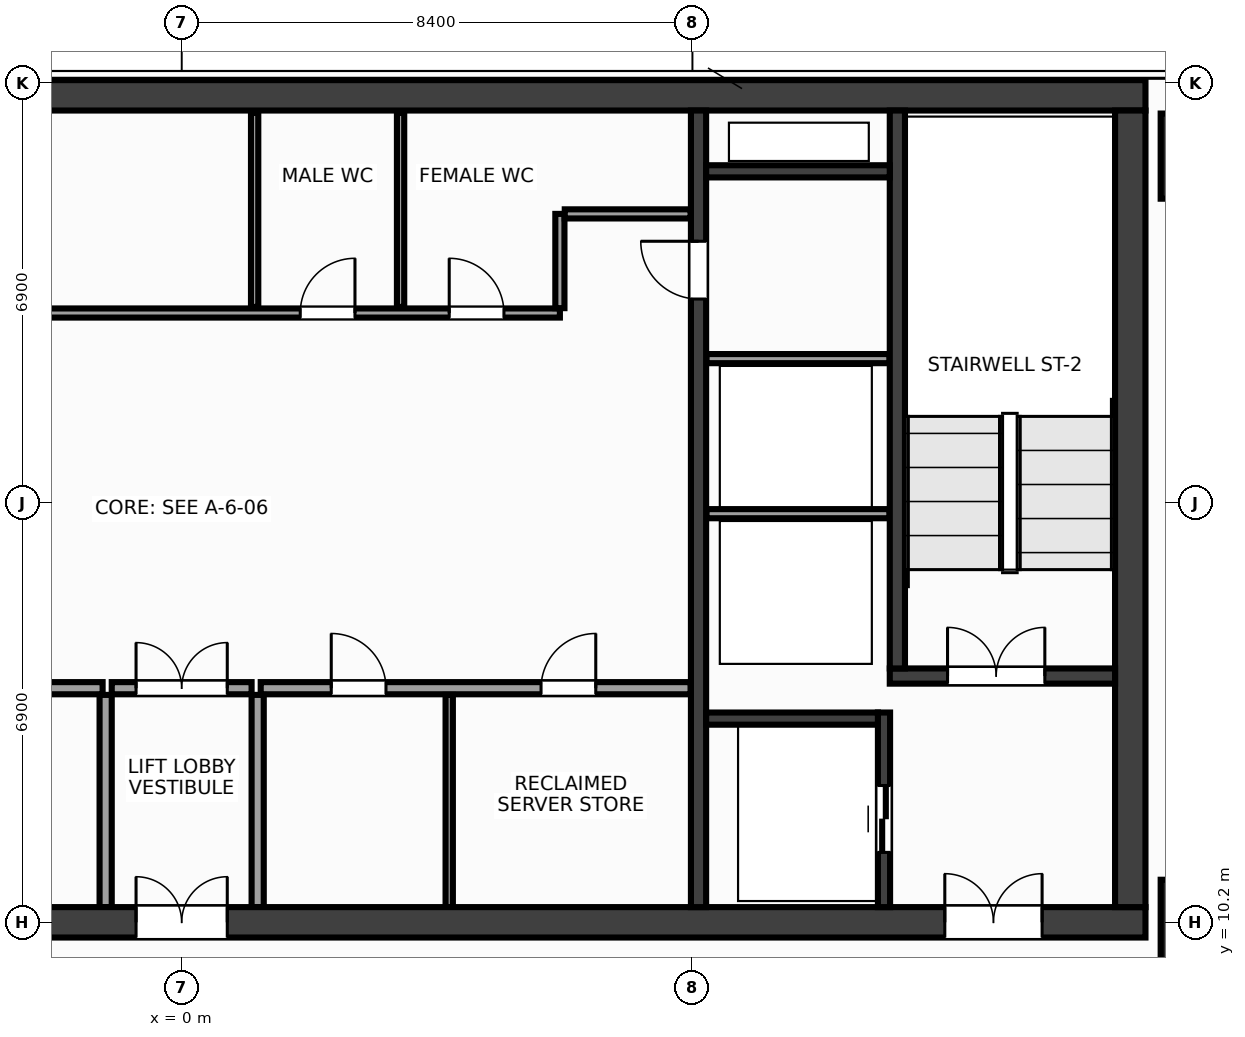
"""IFC4 building model, lengths in metres.
Left out: names, types, materials, properties, quantities, classifications, styles, units other than length and angle.
Written with IfcOpenShell. Run it as: python <this file> out.ifc"""

import sys

from ifc_helpers import new_model, si_unit, direction, frame, frame_2d, origin, origin_2d, place, context, subcontext, project, spatial, rectangle, extrude, source, transform, mapped, element, fill, save


model = new_model("IFC4")
c1 = context("Model", 3, precision=1e-05, world=origin(), true_north=direction((0.0, 1.0)))
c2 = subcontext(c1, "Body", "Model", "MODEL_VIEW")
j1 = project(units=[si_unit("LENGTHUNIT", "METRE"), si_unit("PLANEANGLEUNIT", "RADIAN")], contexts=[c1])
p1 = place(None, origin())
s1 = spatial("IfcSite", under=j1, at=p1, CompositionType="ELEMENT")
p2 = place(p1, origin())
s2 = spatial("IfcBuilding", under=s1, at=p2, CompositionType="ELEMENT")
p3 = place(p2, frame((0.0, 0.0, 250.4)))
s3 = spatial("IfcBuildingStorey", under=s2, at=p3, CompositionType="ELEMENT", Elevation=250.4)
m1 = source(origin(), c2, "Body", "SweptSolid", [
    extrude(rectangle(XDim=31.7, YDim=0.5, at=frame_2d((15.85, 0.0))), origin(), (0.0, 0.0, 1.0), 3.6),
])
p4 = place(p3, frame((-15.85, 23.8, 0.0), z_axis=(0.0, 0.0, 1.0), x_axis=(1.0, 0.0, 0.0)))
e1 = element("IfcWall", 1, at=p4, inside=s3, PredefinedType="SHEAR", context=c2, shape_type="MappedRepresentation", body=[
    mapped(m1, transform((0.0, 0.0, 0.0), x_axis=(1.0, 0.0, 0.0), y_axis=(0.0, 1.0, 0.0), z_axis=(0.0, 0.0, 1.0), scale=1.0)),
])
p5 = place(p3, frame((-15.85, 10.2, 0.0), z_axis=(0.0, 0.0, 1.0), x_axis=(1.0, 0.0, 0.0)))
e2 = element("IfcWall", 2, at=p5, inside=s3, PredefinedType="SHEAR", context=c2, shape_type="MappedRepresentation", body=[
    mapped(m1, transform((0.0, 0.0, 0.0), x_axis=(1.0, 0.0, 0.0), y_axis=(0.0, 1.0, 0.0), z_axis=(0.0, 0.0, 1.0), scale=1.0)),
])
p6 = place(p5, frame((1.7, 0.0, 0.0)))
e3 = element("IfcOpeningElement", 3, at=p6, cuts=e2, PredefinedType="OPENING", context=c2, shape_type="SweptSolid", body=[
    extrude(rectangle(XDim=1.6, YDim=2.15, at=frame_2d((0.8, 1.075))), frame((0.0, 0.262, 0.0), z_axis=(0.0, -1.0, 0.0), x_axis=(1.0, 0.0, 0.0)), (0.0, 0.0, 1.0), 0.524),
])
p7 = place(p5, frame((28.4, 0.0, 0.0)))
e4 = element("IfcOpeningElement", 4, at=p7, cuts=e2, PredefinedType="OPENING", context=c2, shape_type="SweptSolid", body=[
    extrude(rectangle(XDim=1.6, YDim=2.15, at=frame_2d((0.8, 1.075))), frame((0.0, 0.262, 0.0), z_axis=(0.0, -1.0, 0.0), x_axis=(1.0, 0.0, 0.0)), (0.0, 0.0, 1.0), 0.524),
])
p8 = place(p5, frame((15.1, 0.0, 0.0)))
e5 = element("IfcOpeningElement", 5, at=p8, cuts=e2, PredefinedType="OPENING", context=c2, shape_type="SweptSolid", body=[
    extrude(rectangle(XDim=1.5, YDim=2.2, at=frame_2d((0.75, 1.1))), frame((0.0, 0.262, 0.0), z_axis=(0.0, -1.0, 0.0), x_axis=(1.0, 0.0, 0.0)), (0.0, 0.0, 1.0), 0.524),
])
m2 = source(origin(), c2, "Body", "SweptSolid", [
    extrude(rectangle(XDim=13.1, YDim=0.5, at=frame_2d((6.55, 0.0))), origin(), (0.0, 0.0, 1.0), 3.6),
])
p9 = place(p3, frame((15.6, 10.45, 0.0), z_axis=(0.0, 0.0, 1.0), x_axis=(0.0, 1.0, 0.0)))
e6 = element("IfcWall", 6, at=p9, inside=s3, PredefinedType="SHEAR", context=c2, shape_type="MappedRepresentation", body=[
    mapped(m2, transform((0.0, 0.0, 0.0), x_axis=(1.0, 0.0, 0.0), y_axis=(0.0, 1.0, 0.0), z_axis=(0.0, 0.0, 1.0), scale=1.0)),
])
m3 = source(origin(), c2, "Body", "SweptSolid", [
    extrude(rectangle(XDim=13.1, YDim=0.25, at=frame_2d((6.55, 0.0))), origin(), (0.0, 0.0, 1.0), 3.6),
])
p10 = place(p3, frame((8.5, 10.45, 0.0), z_axis=(0.0, 0.0, 1.0), x_axis=(0.0, 1.0, 0.0)))
e7 = element("IfcWall", 7, at=p10, inside=s3, PredefinedType="SHEAR", context=c2, shape_type="MappedRepresentation", body=[
    mapped(m3, transform((0.0, 0.0, 0.0), x_axis=(1.0, 0.0, 0.0), y_axis=(0.0, 1.0, 0.0), z_axis=(0.0, 0.0, 1.0), scale=1.0)),
])
p11 = place(p10, frame((10.0, 0.0, 0.0)))
e8 = element("IfcOpeningElement", 8, at=p11, cuts=e7, PredefinedType="OPENING", context=c2, shape_type="SweptSolid", body=[
    extrude(rectangle(XDim=0.95, YDim=2.15, at=frame_2d((0.475, 1.075))), frame((0.0, 0.137, 0.0), z_axis=(0.0, -1.0, 0.0), x_axis=(1.0, 0.0, 0.0)), (0.0, 0.0, 1.0), 0.274),
])
m4 = source(origin(), c2, "Body", "SweptSolid", [
    extrude(rectangle(XDim=3.705, YDim=0.25, at=frame_2d((1.853, 0.0))), origin(), (0.0, 0.0, 1.0), 3.6),
])
p12 = place(p3, frame((11.645, 14.25, 0.0), z_axis=(0.0, 0.0, 1.0), x_axis=(1.0, 0.0, 0.0)))
e9 = element("IfcWall", 9, at=p12, inside=s3, PredefinedType="SHEAR", context=c2, shape_type="MappedRepresentation", body=[
    mapped(m4, transform((0.0, 0.0, 0.0), x_axis=(1.0, 0.0, 0.0), y_axis=(0.0, 1.0, 0.0), z_axis=(0.0, 0.0, 1.0), scale=1.0)),
])
p13 = place(p12, frame((0.95, 0.0, 0.0)))
e10 = element("IfcOpeningElement", 10, at=p13, cuts=e9, PredefinedType="OPENING", context=c2, shape_type="SweptSolid", body=[
    extrude(rectangle(XDim=1.6, YDim=2.15, at=frame_2d((0.8, 1.075))), frame((0.0, 0.137, 0.0), z_axis=(0.0, -1.0, 0.0), x_axis=(1.0, 0.0, 0.0)), (0.0, 0.0, 1.0), 0.274),
])
m5 = source(origin(), c2, "Body", "SweptSolid", [
    extrude(rectangle(XDim=9.175, YDim=0.25, at=frame_2d((4.587, 0.0))), origin(), (0.0, 0.0, 1.0), 3.6),
])
p14 = place(p3, frame((11.77, 14.375, 0.0), z_axis=(0.0, 0.0, 1.0), x_axis=(0.0, 1.0, 0.0)))
e11 = element("IfcWall", 11, at=p14, inside=s3, PredefinedType="SHEAR", context=c2, shape_type="MappedRepresentation", body=[
    mapped(m5, transform((0.0, 0.0, 0.0), x_axis=(1.0, 0.0, 0.0), y_axis=(0.0, 1.0, 0.0), z_axis=(0.0, 0.0, 1.0), scale=1.0)),
])
m6 = source(origin(), c2, "Body", "SweptSolid", [
    extrude(rectangle(XDim=3.2, YDim=0.2, at=frame_2d((1.6, 0.0))), origin(), (0.0, 0.0, 1.0), 3.6),
])
p15 = place(p3, frame((11.55, 10.45, 0.0), z_axis=(0.0, 0.0, 1.0), x_axis=(0.0, 1.0, 0.0)))
e12 = element("IfcWall", 12, at=p15, inside=s3, PredefinedType="SHEAR", context=c2, shape_type="MappedRepresentation", body=[
    mapped(m6, transform((0.0, 0.0, 0.0), x_axis=(1.0, 0.0, 0.0), y_axis=(0.0, 1.0, 0.0), z_axis=(0.0, 0.0, 1.0), scale=1.0)),
])
p16 = place(p15, frame((0.9, 0.0, 0.0)))
e13 = element("IfcOpeningElement", 13, at=p16, cuts=e12, PredefinedType="OPENING", context=c2, shape_type="SweptSolid", body=[
    extrude(rectangle(XDim=1.1, YDim=2.15, at=frame_2d((0.55, 1.075))), frame((0.0, 0.112, 0.0), z_axis=(0.0, -1.0, 0.0), x_axis=(1.0, 0.0, 0.0)), (0.0, 0.0, 1.0), 0.224),
])
m7 = source(origin(), c2, "Body", "SweptSolid", [
    extrude(rectangle(XDim=2.825, YDim=0.2, at=frame_2d((1.413, 0.0))), origin(), (0.0, 0.0, 1.0), 3.6),
])
p17 = place(p3, frame((8.625, 13.55, 0.0), z_axis=(0.0, 0.0, 1.0), x_axis=(1.0, 0.0, 0.0)))
e14 = element("IfcWall", 14, at=p17, inside=s3, PredefinedType="SHEAR", context=c2, shape_type="MappedRepresentation", body=[
    mapped(m7, transform((0.0, 0.0, 0.0), x_axis=(1.0, 0.0, 0.0), y_axis=(0.0, 1.0, 0.0), z_axis=(0.0, 0.0, 1.0), scale=1.0)),
])
m8 = source(origin(), c2, "Body", "SweptSolid", [
    extrude(rectangle(XDim=3.02, YDim=0.2, at=frame_2d((1.51, 0.0))), origin(), (0.0, 0.0, 1.0), 3.6),
])
p18 = place(p3, frame((8.625, 22.55, 0.0), z_axis=(0.0, 0.0, 1.0), x_axis=(1.0, 0.0, 0.0)))
e15 = element("IfcWall", 15, at=p18, inside=s3, PredefinedType="SHEAR", context=c2, shape_type="MappedRepresentation", body=[
    mapped(m8, transform((0.0, 0.0, 0.0), x_axis=(1.0, 0.0, 0.0), y_axis=(0.0, 1.0, 0.0), z_axis=(0.0, 0.0, 1.0), scale=1.0)),
])
m9 = source(origin(), c2, "Body", "SweptSolid", [
    extrude(rectangle(XDim=1.4, YDim=1.4, at=origin_2d()), origin(), (0.0, 0.0, 1.0), 3.6),
])
for number, where, z_axis, x_axis in (
    (16, (16.8, 10.2, 0.0), (0.0, 0.0, 1.0), (1.0, 0.0, 0.0)),
    (17, (16.8, 22.8, 0.0), (0.0, 0.0, 1.0), (1.0, 0.0, 0.0)),
):
    element("IfcColumn", number, at=place(p3, frame(where, z_axis=z_axis, x_axis=x_axis)), inside=s3, PredefinedType="COLUMN", context=c2, shape_type="MappedRepresentation", body=[
        mapped(m9, transform((0.0, 0.0, 0.0), x_axis=(1.0, 0.0, 0.0), y_axis=(0.0, 1.0, 0.0), z_axis=(0.0, 0.0, 1.0), scale=1.0)),
    ])
m10 = source(origin(), c2, "Body", "SweptSolid", [
    extrude(rectangle(XDim=3.01, YDim=0.15, at=frame_2d((1.505, 0.0))), origin(), (0.0, 0.0, 1.0), 3.37),
])
for number, where, z_axis, x_axis in (
    (18, (8.63, 16.92, 0.0), (0.0, 0.0, 1.0), (1.0, 0.0, 0.0)),
    (19, (8.63, 19.47, 0.0), (0.0, 0.0, 1.0), (1.0, 0.0, 0.0)),
):
    element("IfcWall", number, at=place(p3, frame(where, z_axis=z_axis, x_axis=x_axis)), inside=s3, PredefinedType="PARTITIONING", context=c2, shape_type="MappedRepresentation", body=[
        mapped(m10, transform((0.0, 0.0, 0.0), x_axis=(1.0, 0.0, 0.0), y_axis=(0.0, 1.0, 0.0), z_axis=(0.0, 0.0, 1.0), scale=1.0)),
    ])
m11 = source(origin(), c2, "Body", "SweptSolid", [
    extrude(rectangle(XDim=7.07, YDim=0.2, at=frame_2d((3.535, 0.0))), origin(), (0.0, 0.0, 1.0), 3.37),
])
p19 = place(p3, frame((-8.37, 14.05, 0.0), z_axis=(0.0, 0.0, 1.0), x_axis=(1.0, 0.0, 0.0)))
e20 = element("IfcWall", 20, at=p19, inside=s3, PredefinedType="PARTITIONING", context=c2, shape_type="MappedRepresentation", body=[
    mapped(m11, transform((0.0, 0.0, 0.0), x_axis=(1.0, 0.0, 0.0), y_axis=(0.0, 1.0, 0.0), z_axis=(0.0, 0.0, 1.0), scale=1.0)),
])
p20 = place(p19, frame((2.8, 0.0, 0.0)))
e21 = element("IfcOpeningElement", 21, at=p20, cuts=e20, PredefinedType="OPENING", context=c2, shape_type="SweptSolid", body=[
    extrude(rectangle(XDim=0.98, YDim=2.15, at=frame_2d((0.49, 1.075))), frame((0.0, 0.112, 0.0), z_axis=(0.0, -1.0, 0.0), x_axis=(1.0, 0.0, 0.0)), (0.0, 0.0, 1.0), 0.224),
])
p21 = place(p3, frame((1.3, 14.05, 0.0), z_axis=(0.0, 0.0, 1.0), x_axis=(1.0, 0.0, 0.0)))
e22 = element("IfcWall", 22, at=p21, inside=s3, PredefinedType="PARTITIONING", context=c2, shape_type="MappedRepresentation", body=[
    mapped(m11, transform((0.0, 0.0, 0.0), x_axis=(1.0, 0.0, 0.0), y_axis=(0.0, 1.0, 0.0), z_axis=(0.0, 0.0, 1.0), scale=1.0)),
])
p22 = place(p21, frame((1.16, 0.0, 0.0)))
e23 = element("IfcOpeningElement", 23, at=p22, cuts=e22, PredefinedType="OPENING", context=c2, shape_type="SweptSolid", body=[
    extrude(rectangle(XDim=0.9, YDim=2.15, at=frame_2d((0.45, 1.075))), frame((0.0, 0.112, 0.0), z_axis=(0.0, -1.0, 0.0), x_axis=(1.0, 0.0, 0.0)), (0.0, 0.0, 1.0), 0.224),
])
p23 = place(p21, frame((4.61, 0.0, 0.0)))
e24 = element("IfcOpeningElement", 24, at=p23, cuts=e22, PredefinedType="OPENING", context=c2, shape_type="SweptSolid", body=[
    extrude(rectangle(XDim=0.9, YDim=2.15, at=frame_2d((0.45, 1.075))), frame((0.0, 0.112, 0.0), z_axis=(0.0, -1.0, 0.0), x_axis=(1.0, 0.0, 0.0)), (0.0, 0.0, 1.0), 0.224),
])
m12 = source(origin(), c2, "Body", "SweptSolid", [
    extrude(rectangle(XDim=3.49, YDim=0.2, at=frame_2d((1.745, 0.0))), origin(), (0.0, 0.0, 1.0), 3.37),
])
for number, where, z_axis, x_axis in (
    (25, (-1.25, 10.45, 0.0), (0.0, 0.0, 1.0), (0.0, 1.0, 0.0)),
    (26, (1.25, 10.45, 0.0), (0.0, 0.0, 1.0), (0.0, 1.0, 0.0)),
):
    element("IfcWall", number, at=place(p3, frame(where, z_axis=z_axis, x_axis=x_axis)), inside=s3, PredefinedType="PARTITIONING", context=c2, shape_type="MappedRepresentation", body=[
        mapped(m12, transform((0.0, 0.0, 0.0), x_axis=(1.0, 0.0, 0.0), y_axis=(0.0, 1.0, 0.0), z_axis=(0.0, 0.0, 1.0), scale=1.0)),
    ])
m13 = source(origin(), c2, "Body", "SweptSolid", [
    extrude(rectangle(XDim=2.3, YDim=0.2, at=frame_2d((1.15, 0.0))), origin(), (0.0, 0.0, 1.0), 3.37),
])
p24 = place(p3, frame((-1.15, 14.05, 0.0), z_axis=(0.0, 0.0, 1.0), x_axis=(1.0, 0.0, 0.0)))
e27 = element("IfcWall", 27, at=p24, inside=s3, PredefinedType="PARTITIONING", context=c2, shape_type="MappedRepresentation", body=[
    mapped(m13, transform((0.0, 0.0, 0.0), x_axis=(1.0, 0.0, 0.0), y_axis=(0.0, 1.0, 0.0), z_axis=(0.0, 0.0, 1.0), scale=1.0)),
])
p25 = place(p24, frame((0.4, 0.0, 0.0)))
e28 = element("IfcOpeningElement", 28, at=p25, cuts=e27, PredefinedType="OPENING", context=c2, shape_type="SweptSolid", body=[
    extrude(rectangle(XDim=1.5, YDim=2.2, at=frame_2d((0.75, 1.1))), frame((0.0, 0.112, 0.0), z_axis=(0.0, -1.0, 0.0), x_axis=(1.0, 0.0, 0.0)), (0.0, 0.0, 1.0), 0.224),
])
m14 = source(origin(), c2, "Body", "SweptSolid", [
    extrude(rectangle(XDim=14.59, YDim=0.15, at=frame_2d((7.295, 0.0))), origin(), (0.0, 0.0, 1.0), 3.37),
])
p26 = place(p3, frame((-8.37, 20.22, 0.0), z_axis=(0.0, 0.0, 1.0), x_axis=(1.0, 0.0, 0.0)))
e29 = element("IfcWall", 29, at=p26, inside=s3, PredefinedType="PARTITIONING", context=c2, shape_type="MappedRepresentation", body=[
    mapped(m14, transform((0.0, 0.0, 0.0), x_axis=(1.0, 0.0, 0.0), y_axis=(0.0, 1.0, 0.0), z_axis=(0.0, 0.0, 1.0), scale=1.0)),
])
p27 = place(p26, frame((4.36, 0.0, 0.0)))
e30 = element("IfcOpeningElement", 30, at=p27, cuts=e29, PredefinedType="OPENING", context=c2, shape_type="SweptSolid", body=[
    extrude(rectangle(XDim=0.9, YDim=2.15, at=frame_2d((0.45, 1.075))), frame((0.0, 0.087, 0.0), z_axis=(0.0, -1.0, 0.0), x_axis=(1.0, 0.0, 0.0)), (0.0, 0.0, 1.0), 0.174),
])
p28 = place(p26, frame((10.32, 0.0, 0.0)))
e31 = element("IfcOpeningElement", 31, at=p28, cuts=e29, PredefinedType="OPENING", context=c2, shape_type="SweptSolid", body=[
    extrude(rectangle(XDim=0.9, YDim=2.15, at=frame_2d((0.45, 1.075))), frame((0.0, 0.087, 0.0), z_axis=(0.0, -1.0, 0.0), x_axis=(1.0, 0.0, 0.0)), (0.0, 0.0, 1.0), 0.174),
])
p29 = place(p26, frame((12.77, 0.0, 0.0)))
e32 = element("IfcOpeningElement", 32, at=p29, cuts=e29, PredefinedType="OPENING", context=c2, shape_type="SweptSolid", body=[
    extrude(rectangle(XDim=0.9, YDim=2.15, at=frame_2d((0.45, 1.075))), frame((0.0, 0.087, 0.0), z_axis=(0.0, -1.0, 0.0), x_axis=(1.0, 0.0, 0.0)), (0.0, 0.0, 1.0), 0.174),
])
m15 = source(origin(), c2, "Body", "SweptSolid", [
    extrude(rectangle(XDim=1.55, YDim=0.15, at=frame_2d((0.775, 0.0))), origin(), (0.0, 0.0, 1.0), 3.37),
])
p30 = place(p3, frame((6.22, 20.3, 0.0), z_axis=(0.0, 0.0, 1.0), x_axis=(0.0, 1.0, 0.0)))
e33 = element("IfcWall", 33, at=p30, inside=s3, PredefinedType="PARTITIONING", context=c2, shape_type="MappedRepresentation", body=[
    mapped(m15, transform((0.0, 0.0, 0.0), x_axis=(1.0, 0.0, 0.0), y_axis=(0.0, 1.0, 0.0), z_axis=(0.0, 0.0, 1.0), scale=1.0)),
])
m16 = source(origin(), c2, "Body", "SweptSolid", [
    extrude(rectangle(XDim=2.07, YDim=0.15, at=frame_2d((1.035, 0.0))), origin(), (0.0, 0.0, 1.0), 3.37),
])
p31 = place(p3, frame((6.3, 21.85, 0.0), z_axis=(0.0, 0.0, 1.0), x_axis=(1.0, 0.0, 0.0)))
e34 = element("IfcWall", 34, at=p31, inside=s3, PredefinedType="PARTITIONING", context=c2, shape_type="MappedRepresentation", body=[
    mapped(m16, transform((0.0, 0.0, 0.0), x_axis=(1.0, 0.0, 0.0), y_axis=(0.0, 1.0, 0.0), z_axis=(0.0, 0.0, 1.0), scale=1.0)),
])
m17 = source(origin(), c2, "Body", "SweptSolid", [
    extrude(rectangle(XDim=3.49, YDim=0.12, at=frame_2d((1.745, 0.0))), origin(), (0.0, 0.0, 1.0), 3.37),
])
p32 = place(p3, frame((4.4, 10.45, 0.0), z_axis=(0.0, 0.0, 1.0), x_axis=(0.0, 1.0, 0.0)))
e35 = element("IfcWall", 35, at=p32, inside=s3, PredefinedType="PARTITIONING", context=c2, shape_type="MappedRepresentation", body=[
    mapped(m17, transform((0.0, 0.0, 0.0), x_axis=(1.0, 0.0, 0.0), y_axis=(0.0, 1.0, 0.0), z_axis=(0.0, 0.0, 1.0), scale=1.0)),
])
m18 = source(origin(), c2, "Body", "SweptSolid", [
    extrude(rectangle(XDim=3.19, YDim=0.12, at=frame_2d((1.595, 0.0))), origin(), (0.0, 0.0, 1.0), 3.37),
])
for number, where, z_axis, x_axis in (
    (36, (1.2, 20.32, 0.0), (0.0, 0.0, 1.0), (0.0, 1.0, 0.0)),
    (37, (3.6, 20.32, 0.0), (0.0, 0.0, 1.0), (0.0, 1.0, 0.0)),
):
    element("IfcWall", number, at=place(p3, frame(where, z_axis=z_axis, x_axis=x_axis)), inside=s3, PredefinedType="PARTITIONING", context=c2, shape_type="MappedRepresentation", body=[
        mapped(m18, transform((0.0, 0.0, 0.0), x_axis=(1.0, 0.0, 0.0), y_axis=(0.0, 1.0, 0.0), z_axis=(0.0, 0.0, 1.0), scale=1.0)),
    ])
m19 = source(origin(), c2, "Body", "SweptSolid", [
    extrude(rectangle(XDim=1.6, YDim=2.15, at=frame_2d((0.8, 1.075))), frame((0.0, 0.025, 0.0), z_axis=(0.0, -1.0, 0.0), x_axis=(1.0, 0.0, 0.0)), (0.0, 0.0, 1.0), 0.05),
])
p33 = place(p13, origin())
e38 = element("IfcDoor", 38, at=p33, inside=s3, OperationType="DOUBLE_DOOR_SINGLE_SWING", PredefinedType="DOOR", context=c2, shape_type="MappedRepresentation", body=[
    mapped(m19, transform((0.0, 0.0, 0.0), x_axis=(1.0, 0.0, 0.0), y_axis=(0.0, 1.0, 0.0), z_axis=(0.0, 0.0, 1.0), scale=1.0)),
])
fill(e10, e38)
p34 = place(p7, origin())
e39 = element("IfcDoor", 39, at=p34, inside=s3, OperationType="DOUBLE_DOOR_SINGLE_SWING", PredefinedType="DOOR", context=c2, shape_type="MappedRepresentation", body=[
    mapped(m19, transform((0.0, 0.0, 0.0), x_axis=(1.0, 0.0, 0.0), y_axis=(0.0, 1.0, 0.0), z_axis=(0.0, 0.0, 1.0), scale=1.0)),
])
fill(e4, e39)
m20 = source(origin(), c2, "Body", "SweptSolid", [
    extrude(rectangle(XDim=1.1, YDim=2.15, at=frame_2d((0.55, 1.075))), frame((0.0, 0.025, 0.0), z_axis=(0.0, -1.0, 0.0), x_axis=(1.0, 0.0, 0.0)), (0.0, 0.0, 1.0), 0.05),
])
p35 = place(p16, origin())
e40 = element("IfcDoor", 40, at=p35, inside=s3, OperationType="DOUBLE_DOOR_SLIDING", PredefinedType="DOOR", context=c2, shape_type="MappedRepresentation", body=[
    mapped(m20, transform((0.0, 0.0, 0.0), x_axis=(1.0, 0.0, 0.0), y_axis=(0.0, 1.0, 0.0), z_axis=(0.0, 0.0, 1.0), scale=1.0)),
])
fill(e13, e40)
m21 = source(origin(), c2, "Body", "SweptSolid", [
    extrude(rectangle(XDim=0.95, YDim=2.15, at=frame_2d((0.475, 1.075))), frame((0.0, 0.025, 0.0), z_axis=(0.0, -1.0, 0.0), x_axis=(1.0, 0.0, 0.0)), (0.0, 0.0, 1.0), 0.05),
])
p36 = place(p11, origin())
e41 = element("IfcDoor", 41, at=p36, inside=s3, OperationType="SINGLE_SWING_RIGHT", PredefinedType="DOOR", context=c2, shape_type="MappedRepresentation", body=[
    mapped(m21, transform((0.0, 0.0, 0.0), x_axis=(1.0, 0.0, 0.0), y_axis=(0.0, 1.0, 0.0), z_axis=(0.0, 0.0, 1.0), scale=1.0)),
])
fill(e8, e41)
m22 = source(origin(), c2, "Body", "SweptSolid", [
    extrude(rectangle(XDim=0.9, YDim=2.15, at=frame_2d((0.45, 1.075))), frame((0.0, 0.025, 0.0), z_axis=(0.0, -1.0, 0.0), x_axis=(1.0, 0.0, 0.0)), (0.0, 0.0, 1.0), 0.05),
])
p37 = place(p22, origin())
e42 = element("IfcDoor", 42, at=p37, inside=s3, OperationType="SINGLE_SWING_LEFT", PredefinedType="DOOR", context=c2, shape_type="MappedRepresentation", body=[
    mapped(m22, transform((0.0, 0.0, 0.0), x_axis=(1.0, 0.0, 0.0), y_axis=(0.0, 1.0, 0.0), z_axis=(0.0, 0.0, 1.0), scale=1.0)),
])
fill(e23, e42)
p38 = place(p23, origin())
e43 = element("IfcDoor", 43, at=p38, inside=s3, OperationType="SINGLE_SWING_RIGHT", PredefinedType="DOOR", context=c2, shape_type="MappedRepresentation", body=[
    mapped(m22, transform((0.0, 0.0, 0.0), x_axis=(1.0, 0.0, 0.0), y_axis=(0.0, 1.0, 0.0), z_axis=(0.0, 0.0, 1.0), scale=1.0)),
])
fill(e24, e43)
m23 = source(origin(), c2, "Body", "SweptSolid", [
    extrude(rectangle(XDim=1.5, YDim=2.2, at=frame_2d((0.75, 1.1))), frame((0.0, 0.025, 0.0), z_axis=(0.0, -1.0, 0.0), x_axis=(1.0, 0.0, 0.0)), (0.0, 0.0, 1.0), 0.05),
])
p39 = place(p25, origin())
e44 = element("IfcDoor", 44, at=p39, inside=s3, OperationType="DOUBLE_DOOR_SINGLE_SWING", PredefinedType="DOOR", context=c2, shape_type="MappedRepresentation", body=[
    mapped(m23, transform((0.0, 0.0, 0.0), x_axis=(1.0, 0.0, 0.0), y_axis=(0.0, 1.0, 0.0), z_axis=(0.0, 0.0, 1.0), scale=1.0)),
])
fill(e28, e44)
p40 = place(p8, origin())
e45 = element("IfcDoor", 45, at=p40, inside=s3, OperationType="DOUBLE_DOOR_SINGLE_SWING", PredefinedType="DOOR", context=c2, shape_type="MappedRepresentation", body=[
    mapped(m23, transform((0.0, 0.0, 0.0), x_axis=(1.0, 0.0, 0.0), y_axis=(0.0, 1.0, 0.0), z_axis=(0.0, 0.0, 1.0), scale=1.0)),
])
fill(e5, e45)
p41 = place(p28, origin())
e46 = element("IfcDoor", 46, at=p41, inside=s3, OperationType="SINGLE_SWING_RIGHT", PredefinedType="DOOR", context=c2, shape_type="MappedRepresentation", body=[
    mapped(m22, transform((0.0, 0.0, 0.0), x_axis=(1.0, 0.0, 0.0), y_axis=(0.0, 1.0, 0.0), z_axis=(0.0, 0.0, 1.0), scale=1.0)),
])
fill(e31, e46)
p42 = place(p29, origin())
e47 = element("IfcDoor", 47, at=p42, inside=s3, OperationType="SINGLE_SWING_LEFT", PredefinedType="DOOR", context=c2, shape_type="MappedRepresentation", body=[
    mapped(m22, transform((0.0, 0.0, 0.0), x_axis=(1.0, 0.0, 0.0), y_axis=(0.0, 1.0, 0.0), z_axis=(0.0, 0.0, 1.0), scale=1.0)),
])
fill(e32, e47)
save(model, sys.argv[1])
